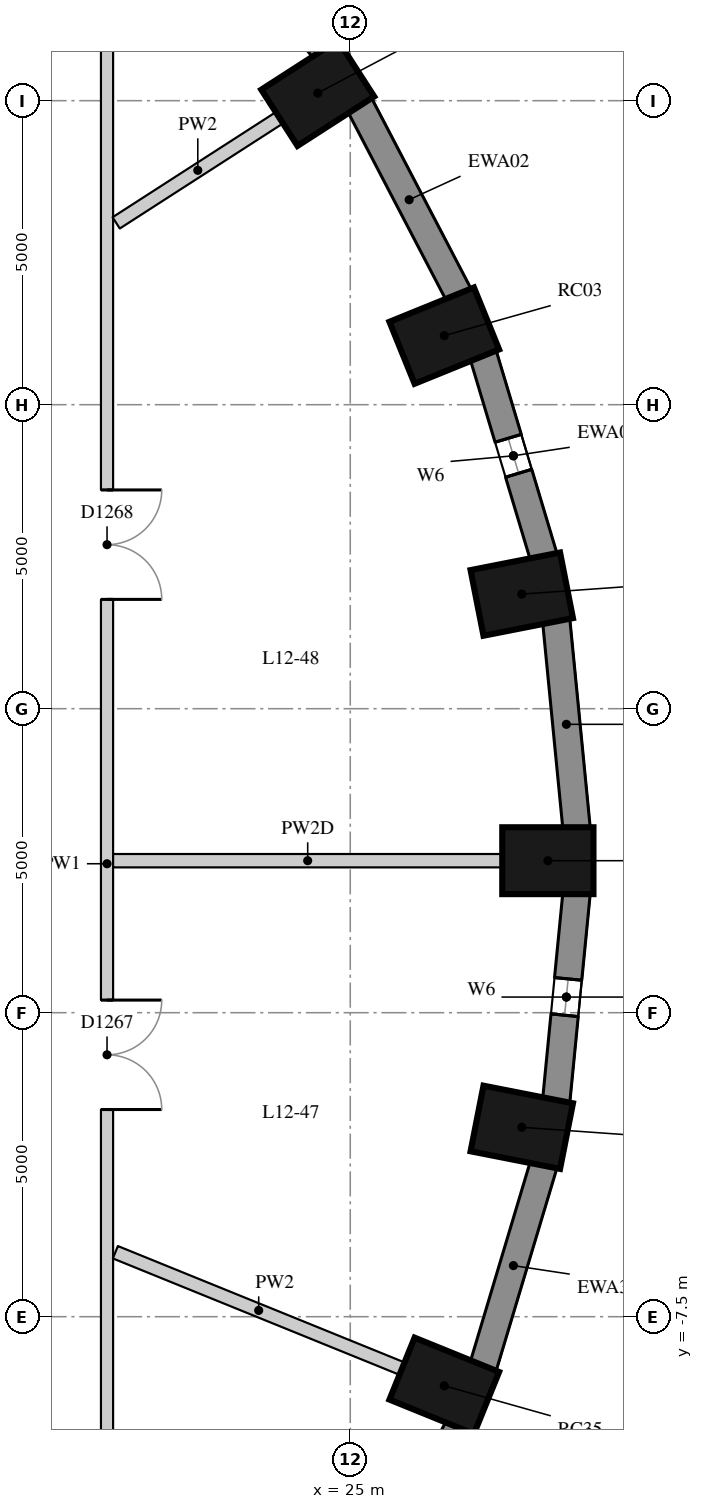
"""IFC4 building model, lengths in metres.
Left out: names, types, materials, properties, quantities, classifications, styles, units other than length and angle.
Written with IfcOpenShell. Run it as: python <this file> out.ifc"""

import sys

from ifc_helpers import new_model, si_unit, direction, frame, frame_2d, origin, origin_2d, place, context, subcontext, project, spatial, rectangle, extrude, element, fill, save


model = new_model("IFC4")
c1 = context("Model", 3, precision=1e-05, world=origin(), true_north=direction((0.0, 1.0)))
c2 = subcontext(c1, "Body", "Model", "MODEL_VIEW")
j1 = project(units=[si_unit("LENGTHUNIT", "METRE"), si_unit("PLANEANGLEUNIT", "RADIAN")], contexts=[c1])
p1 = place(None, origin())
s1 = spatial("IfcSite", under=j1, at=p1, CompositionType="ELEMENT")
p2 = place(p1, origin())
s2 = spatial("IfcBuilding", under=s1, at=p2, CompositionType="ELEMENT")
p3 = place(p2, frame((0.0, 0.0, 48.1)))
s3 = spatial("IfcBuildingStorey", under=s2, at=p3, CompositionType="ELEMENT", Elevation=48.1)
for number, where, z_axis, x_axis in (
    (1, (28.25, 0.0, 0.0), (0.0, 0.0, 1.0), (1.0, 0.0, 0.0)),
    (2, (27.821, 4.385, 0.0), (0.0, 0.0, 1.0), (0.981, 0.193, 0.0)),
    (3, (26.546, 8.636, 0.0), (0.0, 0.0, 1.0), (0.927, 0.376, 0.0)),
    (4, (24.465, 12.625, 0.0), (0.0, 0.0, 1.0), (0.841, 0.541, 0.0)),
    (5, (26.546, -8.636, 0.0), (0.0, 0.0, 1.0), (0.927, -0.376, 0.0)),
    (6, (27.821, -4.385, 0.0), (0.0, 0.0, 1.0), (0.981, -0.193, 0.0)),
):
    element("IfcColumn", number, at=place(p3, frame(where, z_axis=z_axis, x_axis=x_axis)), inside=s3, PredefinedType="COLUMN", context=c2, shape_type="SweptSolid", body=[
        extrude(rectangle(XDim=1.5, YDim=1.1, at=origin_2d()), origin(), (0.0, 0.0, 1.0), 3.3),
    ])
p4 = place(p3, frame((28.722, 0.53, 0.0), z_axis=(0.0, 0.0, 1.0), x_axis=(-0.097389581596, 0.995246336038, 0.0)))
e7 = element("IfcWall", 7, at=p4, inside=s3, PredefinedType="SOLIDWALL", context=c2, shape_type="SweptSolid", body=[
    extrude(rectangle(XDim=3.442, YDim=0.45, at=frame_2d((1.721, 0.0))), origin(), (0.0, 0.0, 1.0), 3.02),
])
p5 = place(p3, frame((28.182, 4.996, 0.0), z_axis=(0.0, 0.0, 1.0), x_axis=(-0.287064133733, 0.957911364963, 0.0)))
e8 = element("IfcWall", 8, at=p5, inside=s3, PredefinedType="SOLIDWALL", context=c2, shape_type="SweptSolid", body=[
    extrude(rectangle(XDim=3.473, YDim=0.45, at=frame_2d((1.737, 0.0))), origin(), (0.0, 0.0, 1.0), 3.02),
])
p6 = place(p5, frame((1.437, 0.0, 0.4)))
e9 = element("IfcOpeningElement", 9, at=p6, cuts=e8, PredefinedType="OPENING", context=c2, shape_type="SweptSolid", body=[
    extrude(rectangle(XDim=0.6, YDim=1.75, at=frame_2d((0.3, 0.875))), frame((0.0, 0.235, 0.0), z_axis=(0.0, -1.0, 0.0), x_axis=(1.0, 0.0, 0.0)), (0.0, 0.0, 1.0), 0.47),
])
p7 = place(p3, frame((26.786, 9.305, 0.0), z_axis=(0.0, 0.0, 1.0), x_axis=(-0.462492775226, 0.886623050041, 0.0)))
e10 = element("IfcWall", 10, at=p7, inside=s3, PredefinedType="SOLIDWALL", context=c2, shape_type="SweptSolid", body=[
    extrude(rectangle(XDim=3.532, YDim=0.45, at=frame_2d((1.766, 0.0))), origin(), (0.0, 0.0, 1.0), 3.02),
])
p8 = place(p3, frame((24.578, 13.328, 0.0), z_axis=(0.0, 0.0, 1.0), x_axis=(-0.616661975264, 0.787228053529, 0.0)))
e11 = element("IfcWall", 11, at=p8, inside=s3, PredefinedType="SOLIDWALL", context=c2, shape_type="SweptSolid", body=[
    extrude(rectangle(XDim=3.61, YDim=0.45, at=frame_2d((1.805, 0.0))), origin(), (0.0, 0.0, 1.0), 3.02),
])
p9 = place(p8, frame((1.505, 0.0, 0.4)))
e12 = element("IfcOpeningElement", 12, at=p9, cuts=e11, PredefinedType="OPENING", context=c2, shape_type="SweptSolid", body=[
    extrude(rectangle(XDim=0.6, YDim=1.75, at=frame_2d((0.3, 0.875))), frame((0.0, 0.235, 0.0), z_axis=(0.0, -1.0, 0.0), x_axis=(1.0, 0.0, 0.0)), (0.0, 0.0, 1.0), 0.47),
])
p10 = place(p3, frame((25.152, -12.437, 0.0), z_axis=(0.0, 0.0, 1.0), x_axis=(0.462492775226, 0.886623050041, 0.0)))
e13 = element("IfcWall", 13, at=p10, inside=s3, PredefinedType="SOLIDWALL", context=c2, shape_type="SweptSolid", body=[
    extrude(rectangle(XDim=3.532, YDim=0.45, at=frame_2d((1.766, 0.0))), origin(), (0.0, 0.0, 1.0), 3.02),
])
p11 = place(p10, frame((1.466, 0.0, 0.4)))
e14 = element("IfcOpeningElement", 14, at=p11, cuts=e13, PredefinedType="OPENING", context=c2, shape_type="SweptSolid", body=[
    extrude(rectangle(XDim=0.6, YDim=1.75, at=frame_2d((0.3, 0.875))), frame((0.0, 0.235, 0.0), z_axis=(0.0, -1.0, 0.0), x_axis=(1.0, 0.0, 0.0)), (0.0, 0.0, 1.0), 0.47),
])
p12 = place(p3, frame((27.185, -8.323, 0.0), z_axis=(0.0, 0.0, 1.0), x_axis=(0.287064133733, 0.957911364963, 0.0)))
e15 = element("IfcWall", 15, at=p12, inside=s3, PredefinedType="SOLIDWALL", context=c2, shape_type="SweptSolid", body=[
    extrude(rectangle(XDim=3.473, YDim=0.45, at=frame_2d((1.737, 0.0))), origin(), (0.0, 0.0, 1.0), 3.02),
])
p13 = place(p3, frame((28.387, -3.956, 0.0), z_axis=(0.0, 0.0, 1.0), x_axis=(0.097389581596, 0.995246336038, 0.0)))
e16 = element("IfcWall", 16, at=p13, inside=s3, PredefinedType="SOLIDWALL", context=c2, shape_type="SweptSolid", body=[
    extrude(rectangle(XDim=3.442, YDim=0.45, at=frame_2d((1.721, 0.0))), origin(), (0.0, 0.0, 1.0), 3.02),
])
p14 = place(p13, frame((1.421, 0.0, 0.4)))
e17 = element("IfcOpeningElement", 17, at=p14, cuts=e16, PredefinedType="OPENING", context=c2, shape_type="SweptSolid", body=[
    extrude(rectangle(XDim=0.6, YDim=1.75, at=frame_2d((0.3, 0.875))), frame((0.0, 0.235, 0.0), z_axis=(0.0, -1.0, 0.0), x_axis=(1.0, 0.0, 0.0)), (0.0, 0.0, 1.0), 0.47),
])
p15 = place(p3, frame((21.0, 13.7, 0.0), z_axis=(0.0, 0.0, 1.0), x_axis=(0.0, -1.0, 0.0)))
e18 = element("IfcWall", 18, at=p15, inside=s3, PredefinedType="PARTITIONING", context=c2, shape_type="SweptSolid", body=[
    extrude(rectangle(XDim=27.5, YDim=0.2, at=frame_2d((13.75, 0.0))), origin(), (0.0, 0.0, 1.0), 3.02),
])
p16 = place(p15, frame((15.992, 0.0, 0.0)))
e19 = element("IfcOpeningElement", 19, at=p16, cuts=e18, PredefinedType="OPENING", context=c2, shape_type="SweptSolid", body=[
    extrude(rectangle(XDim=1.8, YDim=2.1, at=frame_2d((0.9, 1.05))), frame((0.0, 0.11, 0.0), z_axis=(0.0, -1.0, 0.0), x_axis=(1.0, 0.0, 0.0)), (0.0, 0.0, 1.0), 0.22),
])
p17 = place(p15, frame((7.602, 0.0, 0.0)))
e20 = element("IfcOpeningElement", 20, at=p17, cuts=e18, PredefinedType="OPENING", context=c2, shape_type="SweptSolid", body=[
    extrude(rectangle(XDim=1.8, YDim=2.1, at=frame_2d((0.9, 1.05))), frame((0.0, 0.11, 0.0), z_axis=(0.0, -1.0, 0.0), x_axis=(1.0, 0.0, 0.0)), (0.0, 0.0, 1.0), 0.22),
])
p18 = place(p3, frame((27.5, 0.0, 0.0), z_axis=(0.0, 0.0, 1.0), x_axis=(-1.0, 0.0, 0.0)))
e21 = element("IfcWall", 21, at=p18, inside=s3, PredefinedType="PARTITIONING", context=c2, shape_type="SweptSolid", body=[
    extrude(rectangle(XDim=6.4, YDim=0.22, at=frame_2d((3.2, 0.0))), origin(), (0.0, 0.0, 1.0), 2.47),
])
p19 = place(p3, frame((23.835, 12.219, 0.0), z_axis=(0.0, 0.0, 1.0), x_axis=(-0.840711059677, -0.541483992503, 0.0)))
e22 = element("IfcWall", 22, at=p19, inside=s3, PredefinedType="PARTITIONING", context=c2, shape_type="SweptSolid", body=[
    extrude(rectangle(XDim=3.193, YDim=0.22, at=frame_2d((1.596, 0.0))), origin(), (0.0, 0.0, 1.0), 3.02),
])
p20 = place(p3, frame((25.851, -8.354, 0.0), z_axis=(0.0, 0.0, 1.0), x_axis=(-0.926538195631, 0.376200707118, 0.0)))
e23 = element("IfcWall", 23, at=p20, inside=s3, PredefinedType="PARTITIONING", context=c2, shape_type="SweptSolid", body=[
    extrude(rectangle(XDim=5.088, YDim=0.22, at=frame_2d((2.544, 0.0))), origin(), (0.0, 0.0, 1.0), 3.02),
])
p21 = place(p6, origin())
e24 = element("IfcWindow", 24, at=p21, inside=s3, PartitioningType="SINGLE_PANEL", PredefinedType="WINDOW", context=c2, shape_type="SweptSolid", body=[
    extrude(rectangle(XDim=0.6, YDim=1.75, at=frame_2d((0.3, 0.875))), frame((0.0, 0.035, 0.0), z_axis=(0.0, -1.0, 0.0), x_axis=(1.0, 0.0, 0.0)), (0.0, 0.0, 1.0), 0.06),
])
fill(e9, e24)
p22 = place(p14, origin())
e25 = element("IfcWindow", 25, at=p22, inside=s3, PartitioningType="SINGLE_PANEL", PredefinedType="WINDOW", context=c2, shape_type="SweptSolid", body=[
    extrude(rectangle(XDim=0.6, YDim=1.75, at=frame_2d((0.3, 0.875))), frame((0.0, 0.035, 0.0), z_axis=(0.0, -1.0, 0.0), x_axis=(1.0, 0.0, 0.0)), (0.0, 0.0, 1.0), 0.06),
])
fill(e17, e25)
p23 = place(p16, origin())
e26 = element("IfcDoor", 26, at=p23, inside=s3, OperationType="DOUBLE_DOOR_SINGLE_SWING", PredefinedType="DOOR", context=c2, shape_type="SweptSolid", body=[
    extrude(rectangle(XDim=1.8, YDim=2.1, at=frame_2d((0.9, 1.05))), frame((0.0, 0.025, 0.0), z_axis=(0.0, -1.0, 0.0), x_axis=(1.0, 0.0, 0.0)), (0.0, 0.0, 1.0), 0.05),
])
fill(e19, e26)
p24 = place(p17, origin())
e27 = element("IfcDoor", 27, at=p24, inside=s3, OperationType="DOUBLE_DOOR_SINGLE_SWING", PredefinedType="DOOR", context=c2, shape_type="SweptSolid", body=[
    extrude(rectangle(XDim=1.8, YDim=2.1, at=frame_2d((0.9, 1.05))), frame((0.0, 0.025, 0.0), z_axis=(0.0, -1.0, 0.0), x_axis=(1.0, 0.0, 0.0)), (0.0, 0.0, 1.0), 0.05),
])
fill(e20, e27)
save(model, sys.argv[1])
